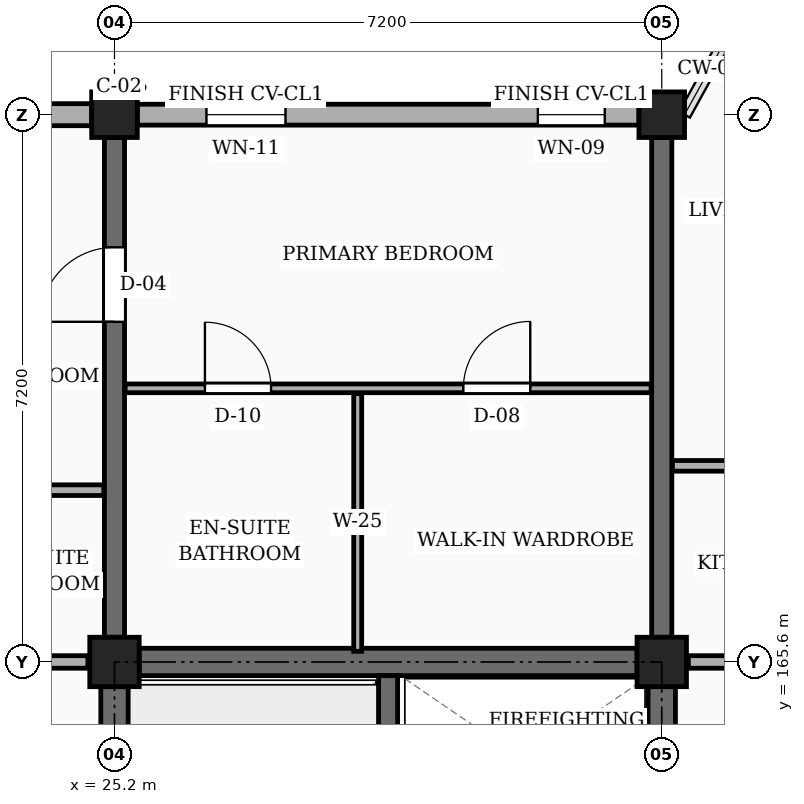
"""IFC4 building model, lengths in metres.
Left out: names, types, materials, properties, quantities, classifications, styles, units other than length and angle.
Written with IfcOpenShell. Run it as: python <this file> out.ifc"""

import sys

from ifc_helpers import new_model, si_unit, direction, frame, frame_2d, origin, origin_2d, place, context, subcontext, project, spatial, rectangle, extrude, element, fill, save


model = new_model("IFC4")
c1 = context("Model", 3, precision=1e-05, world=origin(), true_north=direction((0.0, 1.0)))
c2 = subcontext(c1, "Body", "Model", "MODEL_VIEW")
j1 = project(units=[si_unit("LENGTHUNIT", "METRE"), si_unit("PLANEANGLEUNIT", "RADIAN")], contexts=[c1])
p1 = place(None, origin())
s1 = spatial("IfcSite", under=j1, at=p1, CompositionType="ELEMENT")
p2 = place(p1, origin())
s2 = spatial("IfcBuilding", under=s1, at=p2, CompositionType="ELEMENT")
p3 = place(p2, frame((0.0, 0.0, 7.65)))
s3 = spatial("IfcBuildingStorey", under=s2, at=p3, CompositionType="ELEMENT", Elevation=7.65)
p4 = place(p3, frame((25.2, 165.6, 0.0), z_axis=(0.0, 0.0, 1.0), x_axis=(1.0, 0.0, 0.0)))
e1 = element("IfcColumn", 1, at=p4, inside=s3, PredefinedType="COLUMN", context=c2, shape_type="SweptSolid", body=[
    extrude(rectangle(XDim=0.65, YDim=0.65, at=origin_2d()), origin(), (0.0, 0.0, 1.0), 3.15),
])
p5 = place(p3, frame((25.2, 172.8, 0.0), z_axis=(0.0, 0.0, 1.0), x_axis=(1.0, 0.0, 0.0)))
e2 = element("IfcColumn", 2, at=p5, inside=s3, PredefinedType="COLUMN", context=c2, shape_type="SweptSolid", body=[
    extrude(rectangle(XDim=0.6, YDim=0.6, at=origin_2d()), origin(), (0.0, 0.0, 1.0), 3.15),
])
p6 = place(p3, frame((32.4, 165.6, 0.0), z_axis=(0.0, 0.0, 1.0), x_axis=(1.0, 0.0, 0.0)))
e3 = element("IfcColumn", 3, at=p6, inside=s3, PredefinedType="COLUMN", context=c2, shape_type="SweptSolid", body=[
    extrude(rectangle(XDim=0.65, YDim=0.65, at=origin_2d()), origin(), (0.0, 0.0, 1.0), 3.15),
])
p7 = place(p3, frame((32.4, 172.8, 0.0), z_axis=(0.0, 0.0, 1.0), x_axis=(1.0, 0.0, 0.0)))
e4 = element("IfcColumn", 4, at=p7, inside=s3, PredefinedType="COLUMN", context=c2, shape_type="SweptSolid", body=[
    extrude(rectangle(XDim=0.6, YDim=0.6, at=origin_2d()), origin(), (0.0, 0.0, 1.0), 3.15),
])
p8 = place(p3, frame((25.2, 165.925, 0.0), z_axis=(0.0, 0.0, 1.0), x_axis=(0.0, 1.0, 0.0)))
e5 = element("IfcWall", 5, at=p8, inside=s3, PredefinedType="SOLIDWALL", context=c2, shape_type="SweptSolid", body=[
    extrude(rectangle(XDim=6.575, YDim=0.265, at=frame_2d((3.288, 0.0))), origin(), (0.0, 0.0, 1.0), 2.185),
])
p9 = place(p8, frame((4.15, 0.0, 0.0)))
e6 = element("IfcOpeningElement", 6, at=p9, cuts=e5, PredefinedType="OPENING", context=c2, shape_type="SweptSolid", body=[
    extrude(rectangle(XDim=0.98, YDim=2.12, at=frame_2d((0.49, 1.06))), frame((0.0, 0.143, 0.0), z_axis=(0.0, -1.0, 0.0), x_axis=(1.0, 0.0, 0.0)), (0.0, 0.0, 1.0), 0.285),
])
p10 = place(p3, frame((32.4, 165.925, 0.0), z_axis=(0.0, 0.0, 1.0), x_axis=(0.0, 1.0, 0.0)))
e7 = element("IfcWall", 7, at=p10, inside=s3, PredefinedType="SOLIDWALL", context=c2, shape_type="SweptSolid", body=[
    extrude(rectangle(XDim=6.575, YDim=0.265, at=frame_2d((3.288, 0.0))), origin(), (0.0, 0.0, 1.0), 2.185),
])
p11 = place(p3, frame((32.1, 172.8, 0.0), z_axis=(0.0, 0.0, 1.0), x_axis=(-1.0, 0.0, 0.0)))
e8 = element("IfcWall", 8, at=p11, inside=s3, PredefinedType="SOLIDWALL", context=c2, shape_type="SweptSolid", body=[
    extrude(rectangle(XDim=6.6, YDim=0.275, at=frame_2d((3.3, 0.0))), origin(), (0.0, 0.0, 1.0), 2.455),
])
p12 = place(p11, frame((0.45, 0.0, 0.78)))
e9 = element("IfcOpeningElement", 9, at=p12, cuts=e8, PredefinedType="OPENING", context=c2, shape_type="SweptSolid", body=[
    extrude(rectangle(XDim=0.88, YDim=1.26, at=frame_2d((0.44, 0.63))), frame((0.0, 0.147, 0.0), z_axis=(0.0, -1.0, 0.0), x_axis=(1.0, 0.0, 0.0)), (0.0, 0.0, 1.0), 0.295),
])
p13 = place(p11, frame((4.65, 0.0, 0.78)))
e10 = element("IfcOpeningElement", 10, at=p13, cuts=e8, PredefinedType="OPENING", context=c2, shape_type="SweptSolid", body=[
    extrude(rectangle(XDim=1.04, YDim=1.26, at=frame_2d((0.52, 0.63))), frame((0.0, 0.147, 0.0), z_axis=(0.0, -1.0, 0.0), x_axis=(1.0, 0.0, 0.0)), (0.0, 0.0, 1.0), 0.295),
])
p14 = place(p3, frame((24.9, 172.8, 0.0), z_axis=(0.0, 0.0, 1.0), x_axis=(-1.0, 0.0, 0.0)))
e11 = element("IfcWall", 11, at=p14, inside=s3, PredefinedType="SOLIDWALL", context=c2, shape_type="SweptSolid", body=[
    extrude(rectangle(XDim=3.88, YDim=0.29, at=frame_2d((1.94, 0.0))), origin(), (0.0, 0.0, 1.0), 2.455),
])
p15 = place(p14, frame((1.055, 0.0, 0.78)))
e12 = element("IfcOpeningElement", 12, at=p15, cuts=e11, PredefinedType="OPENING", context=c2, shape_type="SweptSolid", body=[
    extrude(rectangle(XDim=1.04, YDim=1.26, at=frame_2d((0.52, 0.63))), frame((0.0, 0.155, 0.0), z_axis=(0.0, -1.0, 0.0), x_axis=(1.0, 0.0, 0.0)), (0.0, 0.0, 1.0), 0.31),
])
p16 = place(p3, frame((25.2, 158.725, 0.0), z_axis=(0.0, 0.0, 1.0), x_axis=(0.0, 1.0, 0.0)))
e13 = element("IfcWall", 13, at=p16, inside=s3, PredefinedType="SHEAR", context=c2, shape_type="SweptSolid", body=[
    extrude(rectangle(XDim=6.55, YDim=0.36, at=frame_2d((3.275, 0.0))), origin(), (0.0, 0.0, 1.0), 2.885),
])
p17 = place(p3, frame((25.525, 165.6, 0.0), z_axis=(0.0, 0.0, 1.0), x_axis=(1.0, 0.0, 0.0)))
e14 = element("IfcWall", 14, at=p17, inside=s3, PredefinedType="SHEAR", context=c2, shape_type="SweptSolid", body=[
    extrude(rectangle(XDim=6.55, YDim=0.36, at=frame_2d((3.275, 0.0))), origin(), (0.0, 0.0, 1.0), 2.885),
])
p18 = place(p3, frame((32.4, 158.725, 0.0), z_axis=(0.0, 0.0, 1.0), x_axis=(0.0, 1.0, 0.0)))
e15 = element("IfcWall", 15, at=p18, inside=s3, PredefinedType="SHEAR", context=c2, shape_type="SweptSolid", body=[
    extrude(rectangle(XDim=6.55, YDim=0.36, at=frame_2d((3.275, 0.0))), origin(), (0.0, 0.0, 1.0), 2.885),
])
p19 = place(p3, frame((28.8, 158.58, 0.0), z_axis=(0.0, 0.0, 1.0), x_axis=(0.0, 1.0, 0.0)))
e16 = element("IfcWall", 16, at=p19, inside=s3, PredefinedType="SHEAR", context=c2, shape_type="SweptSolid", body=[
    extrude(rectangle(XDim=6.84, YDim=0.25, at=frame_2d((3.42, 0.0))), origin(), (0.0, 0.0, 1.0), 2.885),
])
p20 = place(p19, frame((0.42, 0.0, 0.0)))
e17 = element("IfcOpeningElement", 17, at=p20, cuts=e16, PredefinedType="OPENING", context=c2, shape_type="SweptSolid", body=[
    extrude(rectangle(XDim=1.05, YDim=2.15, at=frame_2d((0.525, 1.075))), frame((0.0, 0.135, 0.0), z_axis=(0.0, -1.0, 0.0), x_axis=(1.0, 0.0, 0.0)), (0.0, 0.0, 1.0), 0.27),
])
p21 = place(p3, frame((18.35, 165.6, 0.0), z_axis=(0.0, 0.0, 1.0), x_axis=(1.0, 0.0, 0.0)))
e18 = element("IfcWall", 18, at=p21, inside=s3, PredefinedType="PARTITIONING", context=c2, shape_type="SweptSolid", body=[
    extrude(rectangle(XDim=6.5, YDim=0.165, at=frame_2d((3.25, 0.0))), origin(), (0.0, 0.0, 1.0), 2.185),
])
p22 = place(p21, frame((1.0, 0.0, 0.0)))
e19 = element("IfcOpeningElement", 19, at=p22, cuts=e18, PredefinedType="OPENING", context=c2, shape_type="SweptSolid", body=[
    extrude(rectangle(XDim=0.94, YDim=2.12, at=frame_2d((0.47, 1.06))), frame((0.0, 0.093, 0.0), z_axis=(0.0, -1.0, 0.0), x_axis=(1.0, 0.0, 0.0)), (0.0, 0.0, 1.0), 0.185),
])
p23 = place(p3, frame((32.75, 165.6, 0.0), z_axis=(0.0, 0.0, 1.0), x_axis=(1.0, 0.0, 0.0)))
e20 = element("IfcWall", 20, at=p23, inside=s3, PredefinedType="PARTITIONING", context=c2, shape_type="SweptSolid", body=[
    extrude(rectangle(XDim=6.5, YDim=0.165, at=frame_2d((3.25, 0.0))), origin(), (0.0, 0.0, 1.0), 2.185),
])
p24 = place(p23, frame((1.0, 0.0, 0.0)))
e21 = element("IfcOpeningElement", 21, at=p24, cuts=e20, PredefinedType="OPENING", context=c2, shape_type="SweptSolid", body=[
    extrude(rectangle(XDim=1.14, YDim=2.18, at=frame_2d((0.57, 1.09))), frame((0.0, 0.093, 0.0), z_axis=(0.0, -1.0, 0.0), x_axis=(1.0, 0.0, 0.0)), (0.0, 0.0, 1.0), 0.185),
])
p25 = place(p3, frame((18.14, 167.86, 0.0), z_axis=(0.0, 0.0, 1.0), x_axis=(1.0, 0.0, 0.0)))
e22 = element("IfcWall", 22, at=p25, inside=s3, PredefinedType="PARTITIONING", context=c2, shape_type="SweptSolid", body=[
    extrude(rectangle(XDim=6.92, YDim=0.14, at=frame_2d((3.46, 0.0))), origin(), (0.0, 0.0, 1.0), 2.32),
])
p26 = place(p25, frame((1.31, 0.0, 0.0)))
e23 = element("IfcOpeningElement", 23, at=p26, cuts=e22, PredefinedType="OPENING", context=c2, shape_type="SweptSolid", body=[
    extrude(rectangle(XDim=0.95, YDim=2.1, at=frame_2d((0.475, 1.05))), frame((0.0, 0.08, 0.0), z_axis=(0.0, -1.0, 0.0), x_axis=(1.0, 0.0, 0.0)), (0.0, 0.0, 1.0), 0.16),
])
p27 = place(p3, frame((25.34, 169.2, 0.0), z_axis=(0.0, 0.0, 1.0), x_axis=(1.0, 0.0, 0.0)))
e24 = element("IfcWall", 24, at=p27, inside=s3, PredefinedType="PARTITIONING", context=c2, shape_type="SweptSolid", body=[
    extrude(rectangle(XDim=6.92, YDim=0.115, at=frame_2d((3.46, 0.0))), origin(), (0.0, 0.0, 1.0), 2.32),
])
p28 = place(p27, frame((1.05, 0.0, 0.0)))
e25 = element("IfcOpeningElement", 25, at=p28, cuts=e24, PredefinedType="OPENING", context=c2, shape_type="SweptSolid", body=[
    extrude(rectangle(XDim=0.87, YDim=2.05, at=frame_2d((0.435, 1.025))), frame((0.0, 0.067, 0.0), z_axis=(0.0, -1.0, 0.0), x_axis=(1.0, 0.0, 0.0)), (0.0, 0.0, 1.0), 0.135),
])
p29 = place(p27, frame((4.45, 0.0, 0.0)))
e26 = element("IfcOpeningElement", 26, at=p29, cuts=e24, PredefinedType="OPENING", context=c2, shape_type="SweptSolid", body=[
    extrude(rectangle(XDim=0.88, YDim=2.08, at=frame_2d((0.44, 1.04))), frame((0.0, 0.067, 0.0), z_axis=(0.0, -1.0, 0.0), x_axis=(1.0, 0.0, 0.0)), (0.0, 0.0, 1.0), 0.135),
])
p30 = place(p3, frame((28.4, 165.74, 0.0), z_axis=(0.0, 0.0, 1.0), x_axis=(0.0, 1.0, 0.0)))
e27 = element("IfcWall", 27, at=p30, inside=s3, PredefinedType="PARTITIONING", context=c2, shape_type="SweptSolid", body=[
    extrude(rectangle(XDim=3.39, YDim=0.105, at=frame_2d((1.695, 0.0))), origin(), (0.0, 0.0, 1.0), 2.32),
])
p31 = place(p3, frame((32.54, 168.18, 0.0), z_axis=(0.0, 0.0, 1.0), x_axis=(1.0, 0.0, 0.0)))
e28 = element("IfcWall", 28, at=p31, inside=s3, PredefinedType="PARTITIONING", context=c2, shape_type="SweptSolid", body=[
    extrude(rectangle(XDim=6.92, YDim=0.14, at=frame_2d((3.46, 0.0))), origin(), (0.0, 0.0, 1.0), 2.32),
])
p32 = place(p31, frame((1.31, 0.0, 0.0)))
e29 = element("IfcOpeningElement", 29, at=p32, cuts=e28, PredefinedType="OPENING", context=c2, shape_type="SweptSolid", body=[
    extrude(rectangle(XDim=0.95, YDim=2.1, at=frame_2d((0.475, 1.05))), frame((0.0, 0.08, 0.0), z_axis=(0.0, -1.0, 0.0), x_axis=(1.0, 0.0, 0.0)), (0.0, 0.0, 1.0), 0.16),
])
p33 = place(p12, origin())
e30 = element("IfcWindow", 30, at=p33, inside=s3, PartitioningType="SINGLE_PANEL", PredefinedType="WINDOW", context=c2, shape_type="SweptSolid", body=[
    extrude(rectangle(XDim=0.88, YDim=1.26, at=frame_2d((0.44, 0.63))), frame((0.0, 0.03, 0.0), z_axis=(0.0, -1.0, 0.0), x_axis=(1.0, 0.0, 0.0)), (0.0, 0.0, 1.0), 0.06),
])
fill(e9, e30)
p34 = place(p13, origin())
e31 = element("IfcWindow", 31, at=p34, inside=s3, PartitioningType="SINGLE_PANEL", PredefinedType="WINDOW", context=c2, shape_type="SweptSolid", body=[
    extrude(rectangle(XDim=1.04, YDim=1.26, at=frame_2d((0.52, 0.63))), frame((0.0, 0.03, 0.0), z_axis=(0.0, -1.0, 0.0), x_axis=(1.0, 0.0, 0.0)), (0.0, 0.0, 1.0), 0.06),
])
fill(e10, e31)
p35 = place(p28, origin())
e32 = element("IfcDoor", 32, at=p35, inside=s3, OperationType="SINGLE_SWING_LEFT", PredefinedType="DOOR", context=c2, shape_type="SweptSolid", body=[
    extrude(rectangle(XDim=0.87, YDim=2.05, at=frame_2d((0.435, 1.025))), frame((0.0, 0.025, 0.0), z_axis=(0.0, -1.0, 0.0), x_axis=(1.0, 0.0, 0.0)), (0.0, 0.0, 1.0), 0.05),
])
fill(e25, e32)
p36 = place(p29, origin())
e33 = element("IfcDoor", 33, at=p36, inside=s3, OperationType="SINGLE_SWING_RIGHT", PredefinedType="DOOR", context=c2, shape_type="SweptSolid", body=[
    extrude(rectangle(XDim=0.88, YDim=2.08, at=frame_2d((0.44, 1.04))), frame((0.0, 0.025, 0.0), z_axis=(0.0, -1.0, 0.0), x_axis=(1.0, 0.0, 0.0)), (0.0, 0.0, 1.0), 0.05),
])
fill(e26, e33)
p37 = place(p9, origin())
e34 = element("IfcDoor", 34, at=p37, inside=s3, OperationType="SINGLE_SWING_LEFT", PredefinedType="DOOR", context=c2, shape_type="SweptSolid", body=[
    extrude(rectangle(XDim=0.98, YDim=2.12, at=frame_2d((0.49, 1.06))), frame((0.0, 0.025, 0.0), z_axis=(0.0, -1.0, 0.0), x_axis=(1.0, 0.0, 0.0)), (0.0, 0.0, 1.0), 0.05),
])
fill(e6, e34)
save(model, sys.argv[1])
